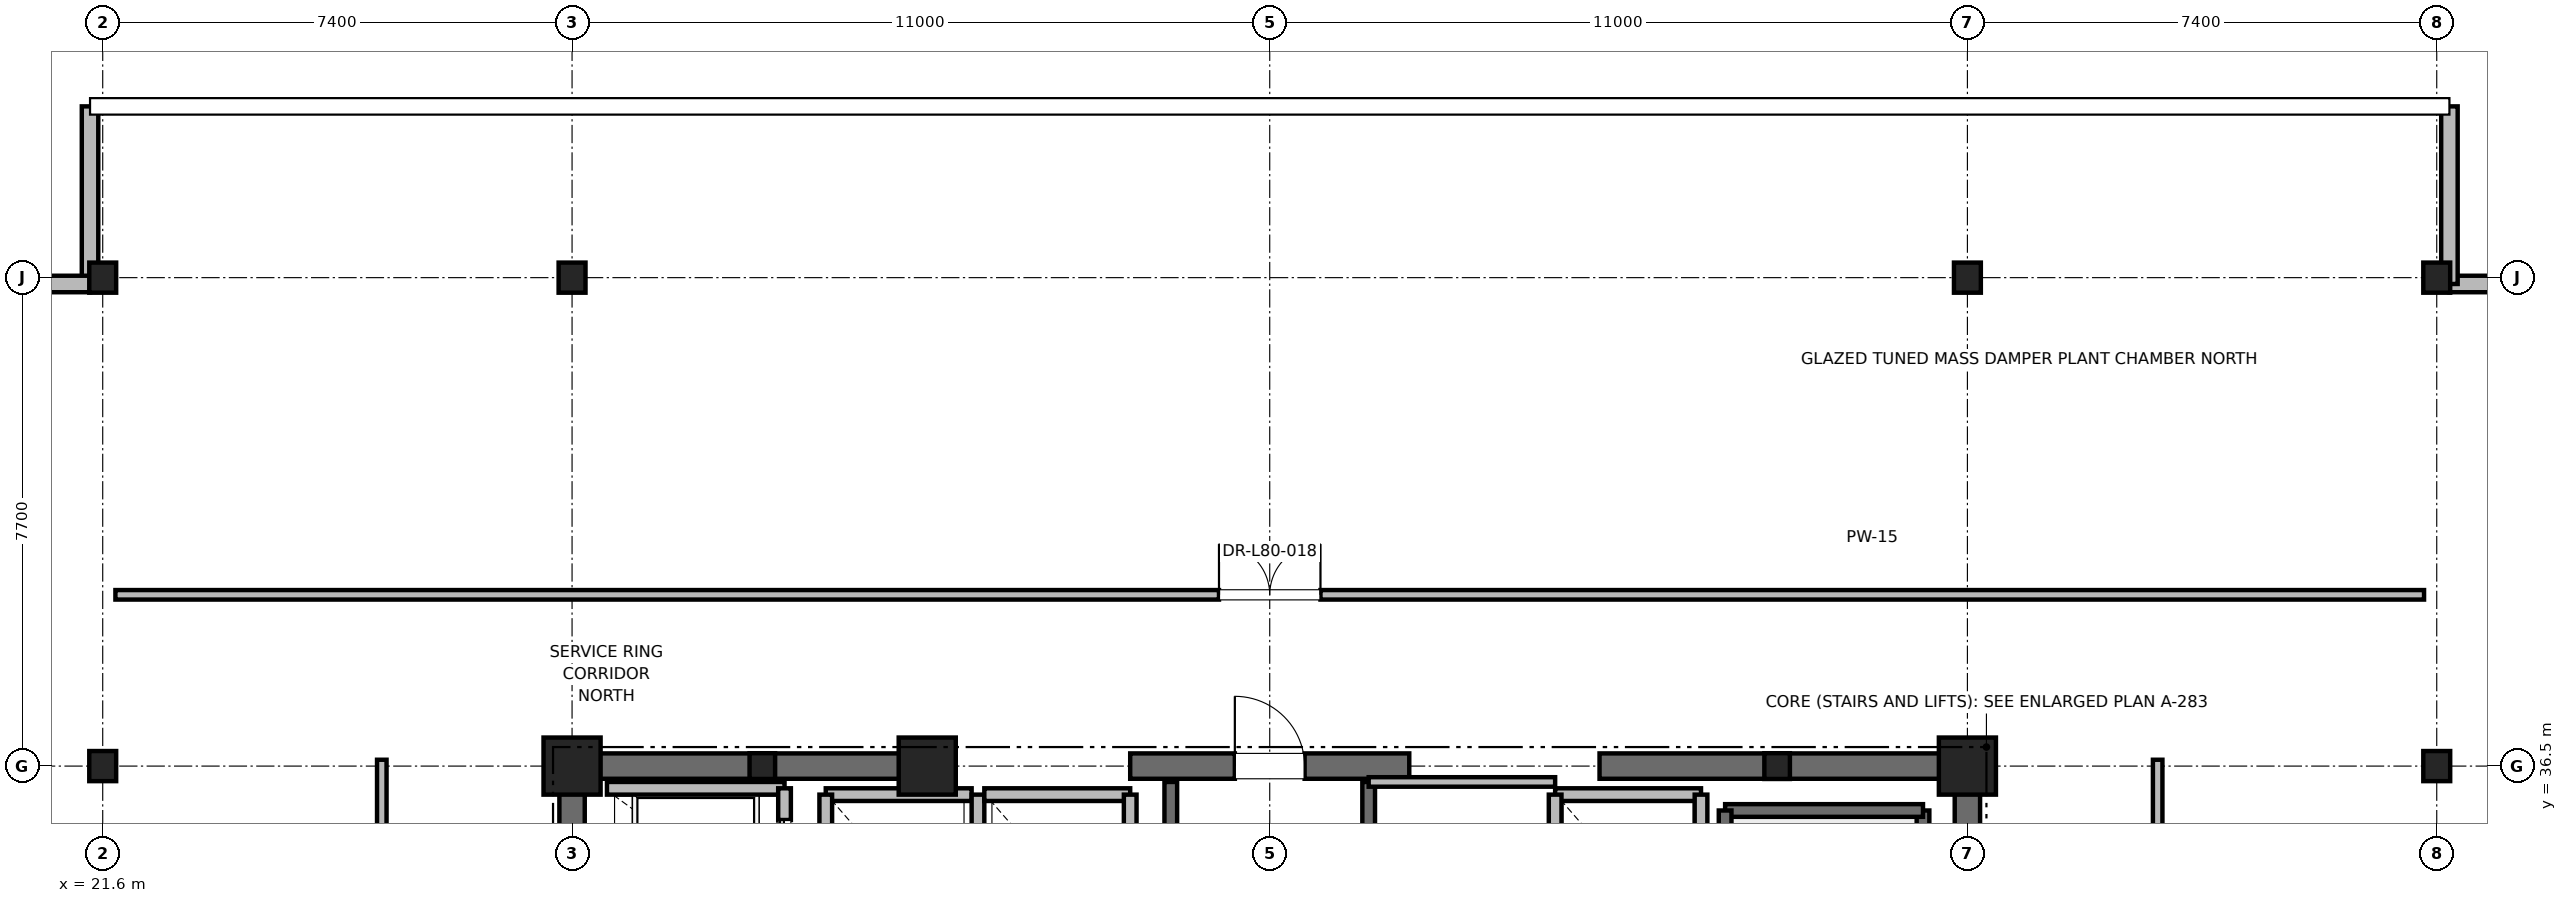
"""IFC4 building model, lengths in metres.
Left out: names, types, materials, properties, quantities, classifications, styles, units other than length and angle.
Written with IfcOpenShell. Run it as: python <this file> out.ifc"""

import sys

from ifc_helpers import new_model, si_unit, direction, frame, frame_2d, origin, origin_2d, place, context, subcontext, project, spatial, rectangle, i_section, extrude, element, fill, save


model = new_model("IFC4")
c1 = context("Model", 3, precision=1e-05, world=origin(), true_north=direction((0.0, 1.0)))
c2 = subcontext(c1, "Body", "Model", "MODEL_VIEW")
j1 = project(units=[si_unit("LENGTHUNIT", "METRE"), si_unit("PLANEANGLEUNIT", "RADIAN")], contexts=[c1])
p1 = place(None, origin())
s1 = spatial("IfcSite", under=j1, at=p1, CompositionType="ELEMENT")
p2 = place(p1, origin())
s2 = spatial("IfcBuilding", under=s1, at=p2, CompositionType="ELEMENT")
p3 = place(p2, frame((0.0, 0.0, 342.8)))
s3 = spatial("IfcBuildingStorey", under=s2, at=p3, CompositionType="ELEMENT", Elevation=342.8)
for number, where, z_axis, x_axis in (
    (1, (29.0, 44.2, 0.0), (0.0, 0.0, 1.0), (1.0, 0.0, 0.0)),
    (2, (51.0, 44.2, 0.0), (0.0, 0.0, 1.0), (1.0, 0.0, 0.0)),
    (3, (21.6, 36.5, 0.0), (0.0, 0.0, 1.0), (1.0, 0.0, 0.0)),
    (4, (58.4, 36.5, 0.0), (0.0, 0.0, 1.0), (1.0, 0.0, 0.0)),
    (5, (21.6, 44.2, 0.0), (0.0, 0.0, 1.0), (1.0, 0.0, 0.0)),
    (6, (58.4, 44.2, 0.0), (0.0, 0.0, 1.0), (1.0, 0.0, 0.0)),
):
    element("IfcColumn", number, at=place(p3, frame(where, z_axis=z_axis, x_axis=x_axis)), inside=s3, PredefinedType="COLUMN", context=c2, shape_type="SweptSolid", body=[
        extrude(i_section(OverallWidth=0.424, OverallDepth=0.475, WebThickness=0.048, FlangeThickness=0.077, FilletRadius=0.015, at=origin_2d()), origin(), (0.0, 0.0, 1.0), 6.0),
    ])
for number, where, z_axis, x_axis in (
    (7, (29.0, 36.5, 0.0), (0.0, 0.0, 1.0), (1.0, 0.0, 0.0)),
    (8, (51.0, 36.5, 0.0), (0.0, 0.0, 1.0), (1.0, 0.0, 0.0)),
    (9, (34.6, 36.5, 0.0), (0.0, 0.0, 1.0), (1.0, 0.0, 0.0)),
):
    element("IfcColumn", number, at=place(p3, frame(where, z_axis=z_axis, x_axis=x_axis)), inside=s3, PredefinedType="PILASTER", context=c2, shape_type="SweptSolid", body=[
        extrude(rectangle(XDim=0.9, YDim=0.9, at=origin_2d()), origin(), (0.0, 0.0, 1.0), 6.0),
    ])
for number, where, z_axis, x_axis in (
    (10, (32.0, 36.5, 0.0), (0.0, 0.0, 1.0), (1.0, 0.0, 0.0)),
    (11, (48.0, 36.5, 0.0), (0.0, 0.0, 1.0), (1.0, 0.0, 0.0)),
):
    element("IfcColumn", number, at=place(p3, frame(where, z_axis=z_axis, x_axis=x_axis)), inside=s3, PredefinedType="COLUMN", context=c2, shape_type="SweptSolid", body=[
        extrude(i_section(OverallWidth=0.403, OverallDepth=0.406, WebThickness=0.027, FlangeThickness=0.043, FilletRadius=0.015, at=origin_2d()), origin(), (0.0, 0.0, 1.0), 6.0),
    ])
p4 = place(p3, frame((29.0, 36.5, 0.0), z_axis=(0.0, 0.0, 1.0), x_axis=(1.0, 0.0, 0.0)))
e12 = element("IfcWall", 12, at=p4, inside=s3, PredefinedType="SHEAR", context=c2, shape_type="SweptSolid", body=[
    extrude(rectangle(XDim=5.8, YDim=0.4, at=frame_2d((2.9, 0.0))), origin(), (0.0, 0.0, 1.0), 5.7),
])
p5 = place(p3, frame((37.8, 36.5, 0.0), z_axis=(0.0, 0.0, 1.0), x_axis=(1.0, 0.0, 0.0)))
e13 = element("IfcWall", 13, at=p5, inside=s3, PredefinedType="SHEAR", context=c2, shape_type="SweptSolid", body=[
    extrude(rectangle(XDim=4.4, YDim=0.4, at=frame_2d((2.2, 0.0))), origin(), (0.0, 0.0, 1.0), 5.7),
])
p6 = place(p5, frame((1.65, 0.0, 0.0)))
e14 = element("IfcOpeningElement", 14, at=p6, cuts=e13, PredefinedType="OPENING", context=c2, shape_type="SweptSolid", body=[
    extrude(rectangle(XDim=1.1, YDim=2.15, at=frame_2d((0.55, 1.075))), frame((0.0, 0.2, 0.0), z_axis=(0.0, -1.0, 0.0), x_axis=(1.0, 0.0, 0.0)), (0.0, 0.0, 1.0), 0.4),
])
for number, where, z_axis, x_axis in (
    (15, (45.2, 36.5, 0.0), (0.0, 0.0, 1.0), (1.0, 0.0, 0.0)),
    (16, (29.0, 30.7, 0.0), (0.0, 0.0, 1.0), (0.0, 1.0, 0.0)),
):
    element("IfcWall", number, at=place(p3, frame(where, z_axis=z_axis, x_axis=x_axis)), inside=s3, PredefinedType="SHEAR", context=c2, shape_type="SweptSolid", body=[
        extrude(rectangle(XDim=5.8, YDim=0.4, at=frame_2d((2.9, 0.0))), origin(), (0.0, 0.0, 1.0), 5.7),
    ])
p7 = place(p3, frame((51.0, 27.7, 0.0), z_axis=(0.0, 0.0, 1.0), x_axis=(0.0, 1.0, 0.0)))
e17 = element("IfcWall", 17, at=p7, inside=s3, PredefinedType="SHEAR", context=c2, shape_type="SweptSolid", body=[
    extrude(rectangle(XDim=8.8, YDim=0.4, at=frame_2d((4.4, 0.0))), origin(), (0.0, 0.0, 1.0), 5.7),
])
p8 = place(p3, frame((61.8, 44.1, 0.0), z_axis=(0.0, 0.0, 1.0), x_axis=(-1.0, 0.0, 0.0)))
e18 = element("IfcWall", 18, at=p8, inside=s3, PredefinedType="PARAPET", context=c2, shape_type="SweptSolid", body=[
    extrude(rectangle(XDim=3.2, YDim=0.26, at=frame_2d((1.6, 0.0))), origin(), (0.0, 0.0, 1.0), 4.753),
])
p9 = place(p8, frame((0.7, 0.0, 0.85)))
e19 = element("IfcOpeningElement", 19, at=p9, cuts=e18, PredefinedType="OPENING", context=c2, shape_type="SweptSolid", body=[
    extrude(rectangle(XDim=1.8, YDim=2.2, at=frame_2d((0.9, 1.1))), frame((0.0, 0.13, 0.0), z_axis=(0.0, -1.0, 0.0), x_axis=(1.0, 0.0, 0.0)), (0.0, 0.0, 1.0), 0.26),
])
for number, where, z_axis, x_axis in (
    (20, (58.6, 44.1, 0.0), (0.0, 0.0, 1.0), (0.0, 1.0, 0.0)),
    (21, (21.4, 46.9, 0.0), (0.0, 0.0, 1.0), (0.0, -1.0, 0.0)),
):
    element("IfcWall", number, at=place(p3, frame(where, z_axis=z_axis, x_axis=x_axis)), inside=s3, PredefinedType="PARAPET", context=c2, shape_type="SweptSolid", body=[
        extrude(rectangle(XDim=2.8, YDim=0.26, at=frame_2d((1.4, 0.0))), origin(), (0.0, 0.0, 1.0), 4.753),
    ])
p10 = place(p3, frame((21.4, 44.1, 0.0), z_axis=(0.0, 0.0, 1.0), x_axis=(-1.0, 0.0, 0.0)))
e22 = element("IfcWall", 22, at=p10, inside=s3, PredefinedType="PARAPET", context=c2, shape_type="SweptSolid", body=[
    extrude(rectangle(XDim=3.2, YDim=0.26, at=frame_2d((1.6, 0.0))), origin(), (0.0, 0.0, 1.0), 4.753),
])
p11 = place(p3, frame((50.3, 27.65, 0.0), z_axis=(0.0, 0.0, 1.0), x_axis=(0.0, 1.0, 0.0)))
e23 = element("IfcWall", 23, at=p11, inside=s3, PredefinedType="SOLIDWALL", context=c2, shape_type="SweptSolid", body=[
    extrude(rectangle(XDim=8.15, YDim=0.2, at=frame_2d((4.075, 0.0))), origin(), (0.0, 0.0, 1.0), 5.7),
])
p12 = place(p3, frame((47.18, 35.8, 0.0), z_axis=(0.0, 0.0, 1.0), x_axis=(1.0, 0.0, 0.0)))
e24 = element("IfcWall", 24, at=p12, inside=s3, PredefinedType="SOLIDWALL", context=c2, shape_type="SweptSolid", body=[
    extrude(rectangle(XDim=3.12, YDim=0.2, at=frame_2d((1.56, 0.0))), origin(), (0.0, 0.0, 1.0), 5.7),
])
p13 = place(p3, frame((47.18, 27.62, 0.0), z_axis=(0.0, 0.0, 1.0), x_axis=(0.0, 1.0, 0.0)))
e25 = element("IfcWall", 25, at=p13, inside=s3, PredefinedType="SOLIDWALL", context=c2, shape_type="SweptSolid", body=[
    extrude(rectangle(XDim=8.18, YDim=0.2, at=frame_2d((4.09, 0.0))), origin(), (0.0, 0.0, 1.0), 5.7),
])
p14 = place(p3, frame((38.44, 27.38, 0.0), z_axis=(0.0, 0.0, 1.0), x_axis=(0.0, 1.0, 0.0)))
e26 = element("IfcWall", 26, at=p14, inside=s3, PredefinedType="SOLIDWALL", context=c2, shape_type="SweptSolid", body=[
    extrude(rectangle(XDim=8.87, YDim=0.2, at=frame_2d((4.435, 0.0))), origin(), (0.0, 0.0, 1.0), 5.7),
])
p15 = place(p3, frame((41.56, 27.68, 0.0), z_axis=(0.0, 0.0, 1.0), x_axis=(0.0, 1.0, 0.0)))
e27 = element("IfcWall", 27, at=p15, inside=s3, PredefinedType="SOLIDWALL", context=c2, shape_type="SweptSolid", body=[
    extrude(rectangle(XDim=8.57, YDim=0.2, at=frame_2d((4.285, 0.0))), origin(), (0.0, 0.0, 1.0), 5.7),
])
p16 = place(p3, frame((32.35, 36.15, 0.0), z_axis=(0.0, 0.0, 1.0), x_axis=(-1.0, 0.0, 0.0)))
e28 = element("IfcWall", 28, at=p16, inside=s3, PredefinedType="SOLIDWALL", context=c2, shape_type="SweptSolid", body=[
    extrude(rectangle(XDim=2.8, YDim=0.2, at=frame_2d((1.4, 0.0))), origin(), (0.0, 0.0, 1.0), 4.753),
])
p17 = place(p3, frame((32.35, 34.05, 0.0), z_axis=(0.0, 0.0, 1.0), x_axis=(0.0, 1.0, 0.0)))
e29 = element("IfcWall", 29, at=p17, inside=s3, PredefinedType="SOLIDWALL", context=c2, shape_type="SweptSolid", body=[
    extrude(rectangle(XDim=2.1, YDim=0.2, at=frame_2d((1.05, 0.0))), origin(), (0.0, 0.0, 1.0), 5.7),
])
p18 = place(p17, frame((0.5, 0.0, 0.0)))
e30 = element("IfcOpeningElement", 30, at=p18, cuts=e29, PredefinedType="OPENING", context=c2, shape_type="SweptSolid", body=[
    extrude(rectangle(XDim=1.1, YDim=2.2, at=frame_2d((0.55, 1.1))), frame((0.0, 0.1, 0.0), z_axis=(0.0, -1.0, 0.0), x_axis=(1.0, 0.0, 0.0)), (0.0, 0.0, 1.0), 0.2),
])
p19 = place(p3, frame((35.3, 36.05, 0.0), z_axis=(0.0, 0.0, 1.0), x_axis=(-1.0, 0.0, 0.0)))
e31 = element("IfcWall", 31, at=p19, inside=s3, PredefinedType="SOLIDWALL", context=c2, shape_type="SweptSolid", body=[
    extrude(rectangle(XDim=2.3, YDim=0.2, at=frame_2d((1.15, 0.0))), origin(), (0.0, 0.0, 1.0), 4.78),
])
p20 = place(p3, frame((33.0, 36.05, 0.0), z_axis=(0.0, 0.0, 1.0), x_axis=(0.0, -1.0, 0.0)))
e32 = element("IfcWall", 32, at=p20, inside=s3, PredefinedType="SOLIDWALL", context=c2, shape_type="SweptSolid", body=[
    extrude(rectangle(XDim=2.6, YDim=0.2, at=frame_2d((1.3, 0.0))), origin(), (0.0, 0.0, 1.0), 5.7),
])
p21 = place(p3, frame((35.4, 33.45, 0.0), z_axis=(0.0, 0.0, 1.0), x_axis=(0.0, 1.0, 0.0)))
e33 = element("IfcWall", 33, at=p21, inside=s3, PredefinedType="SOLIDWALL", context=c2, shape_type="SweptSolid", body=[
    extrude(rectangle(XDim=2.6, YDim=0.2, at=frame_2d((1.3, 0.0))), origin(), (0.0, 0.0, 1.0), 4.78),
])
p22 = place(p3, frame((37.8, 36.05, 0.0), z_axis=(0.0, 0.0, 1.0), x_axis=(-1.0, 0.0, 0.0)))
e34 = element("IfcWall", 34, at=p22, inside=s3, PredefinedType="SOLIDWALL", context=c2, shape_type="SweptSolid", body=[
    extrude(rectangle(XDim=2.3, YDim=0.2, at=frame_2d((1.15, 0.0))), origin(), (0.0, 0.0, 1.0), 4.78),
])
p23 = place(p3, frame((37.8, 33.45, 0.0), z_axis=(0.0, 0.0, 1.0), x_axis=(0.0, 1.0, 0.0)))
e35 = element("IfcWall", 35, at=p23, inside=s3, PredefinedType="SOLIDWALL", context=c2, shape_type="SweptSolid", body=[
    extrude(rectangle(XDim=2.6, YDim=0.2, at=frame_2d((1.3, 0.0))), origin(), (0.0, 0.0, 1.0), 4.78),
])
p24 = place(p3, frame((46.8, 36.05, 0.0), z_axis=(0.0, 0.0, 1.0), x_axis=(-1.0, 0.0, 0.0)))
e36 = element("IfcWall", 36, at=p24, inside=s3, PredefinedType="SOLIDWALL", context=c2, shape_type="SweptSolid", body=[
    extrude(rectangle(XDim=2.3, YDim=0.2, at=frame_2d((1.15, 0.0))), origin(), (0.0, 0.0, 1.0), 4.78),
])
p25 = place(p3, frame((44.5, 36.05, 0.0), z_axis=(0.0, 0.0, 1.0), x_axis=(0.0, -1.0, 0.0)))
e37 = element("IfcWall", 37, at=p25, inside=s3, PredefinedType="SOLIDWALL", context=c2, shape_type="SweptSolid", body=[
    extrude(rectangle(XDim=2.6, YDim=0.2, at=frame_2d((1.3, 0.0))), origin(), (0.0, 0.0, 1.0), 4.78),
])
p26 = place(p3, frame((46.8, 33.45, 0.0), z_axis=(0.0, 0.0, 1.0), x_axis=(0.0, 1.0, 0.0)))
e38 = element("IfcWall", 38, at=p26, inside=s3, PredefinedType="SOLIDWALL", context=c2, shape_type="SweptSolid", body=[
    extrude(rectangle(XDim=2.6, YDim=0.2, at=frame_2d((1.3, 0.0))), origin(), (0.0, 0.0, 1.0), 5.7),
])
p27 = place(p3, frame((41.56, 36.25, 0.0), z_axis=(0.0, 0.0, 1.0), x_axis=(1.0, 0.0, 0.0)))
e39 = element("IfcWall", 39, at=p27, inside=s3, PredefinedType="PARTITIONING", context=c2, shape_type="SweptSolid", body=[
    extrude(rectangle(XDim=2.94, YDim=0.15, at=frame_2d((1.47, 0.0))), origin(), (0.0, 0.0, 1.0), 2.85),
])
p28 = place(p3, frame((21.8, 39.2, 0.0), z_axis=(0.0, 0.0, 1.0), x_axis=(1.0, 0.0, 0.0)))
e40 = element("IfcWall", 40, at=p28, inside=s3, PredefinedType="PARTITIONING", context=c2, shape_type="SweptSolid", body=[
    extrude(rectangle(XDim=36.4, YDim=0.15, at=frame_2d((18.2, 0.0))), origin(), (0.0, 0.0, 1.0), 2.85),
])
p29 = place(p28, frame((17.4, 0.0, 0.0)))
e41 = element("IfcOpeningElement", 41, at=p29, cuts=e40, PredefinedType="OPENING", context=c2, shape_type="SweptSolid", body=[
    extrude(rectangle(XDim=1.6, YDim=2.25, at=frame_2d((0.8, 1.125))), frame((0.0, 0.075, 0.0), z_axis=(0.0, -1.0, 0.0), x_axis=(1.0, 0.0, 0.0)), (0.0, 0.0, 1.0), 0.15),
])
p30 = place(p3, frame((26.0, 18.4, 0.0), z_axis=(0.0, 0.0, 1.0), x_axis=(0.0, 1.0, 0.0)))
e42 = element("IfcWall", 42, at=p30, inside=s3, PredefinedType="PARTITIONING", context=c2, shape_type="SweptSolid", body=[
    extrude(rectangle(XDim=18.2, YDim=0.15, at=frame_2d((9.1, 0.0))), origin(), (0.0, 0.0, 1.0), 2.85),
])
p31 = place(p30, frame((8.3, 0.0, 0.0)))
e43 = element("IfcOpeningElement", 43, at=p31, cuts=e42, PredefinedType="OPENING", context=c2, shape_type="SweptSolid", body=[
    extrude(rectangle(XDim=1.6, YDim=2.25, at=frame_2d((0.8, 1.125))), frame((0.0, 0.075, 0.0), z_axis=(0.0, -1.0, 0.0), x_axis=(1.0, 0.0, 0.0)), (0.0, 0.0, 1.0), 0.15),
])
p32 = place(p3, frame((54.0, 18.4, 0.0), z_axis=(0.0, 0.0, 1.0), x_axis=(0.0, 1.0, 0.0)))
e44 = element("IfcWall", 44, at=p32, inside=s3, PredefinedType="PARTITIONING", context=c2, shape_type="SweptSolid", body=[
    extrude(rectangle(XDim=18.2, YDim=0.15, at=frame_2d((9.1, 0.0))), origin(), (0.0, 0.0, 1.0), 2.85),
])
p33 = place(p32, frame((8.3, 0.0, 0.0)))
e45 = element("IfcOpeningElement", 45, at=p33, cuts=e44, PredefinedType="OPENING", context=c2, shape_type="SweptSolid", body=[
    extrude(rectangle(XDim=1.6, YDim=2.25, at=frame_2d((0.8, 1.125))), frame((0.0, 0.075, 0.0), z_axis=(0.0, -1.0, 0.0), x_axis=(1.0, 0.0, 0.0)), (0.0, 0.0, 1.0), 0.15),
])
p34 = place(p6, origin())
e46 = element("IfcDoor", 46, at=p34, inside=s3, OperationType="SINGLE_SWING_LEFT", PredefinedType="DOOR", context=c2, shape_type="SweptSolid", body=[
    extrude(rectangle(XDim=1.1, YDim=2.15, at=frame_2d((0.55, 1.075))), frame((0.0, 0.025, 0.0), z_axis=(0.0, -1.0, 0.0), x_axis=(1.0, 0.0, 0.0)), (0.0, 0.0, 1.0), 0.05),
])
fill(e14, e46)
p35 = place(p18, origin())
e47 = element("IfcDoor", 47, at=p35, inside=s3, OperationType="SLIDING_TO_RIGHT", PredefinedType="DOOR", context=c2, shape_type="SweptSolid", body=[
    extrude(rectangle(XDim=1.1, YDim=2.2, at=frame_2d((0.55, 1.1))), frame((0.0, 0.025, 0.0), z_axis=(0.0, -1.0, 0.0), x_axis=(1.0, 0.0, 0.0)), (0.0, 0.0, 1.0), 0.05),
])
fill(e30, e47)
p36 = place(p29, origin())
e48 = element("IfcDoor", 48, at=p36, inside=s3, OperationType="DOUBLE_DOOR_SINGLE_SWING", PredefinedType="DOOR", context=c2, shape_type="SweptSolid", body=[
    extrude(rectangle(XDim=1.6, YDim=2.25, at=frame_2d((0.8, 1.125))), frame((0.0, 0.025, 0.0), z_axis=(0.0, -1.0, 0.0), x_axis=(1.0, 0.0, 0.0)), (0.0, 0.0, 1.0), 0.05),
])
fill(e41, e48)
save(model, sys.argv[1])
